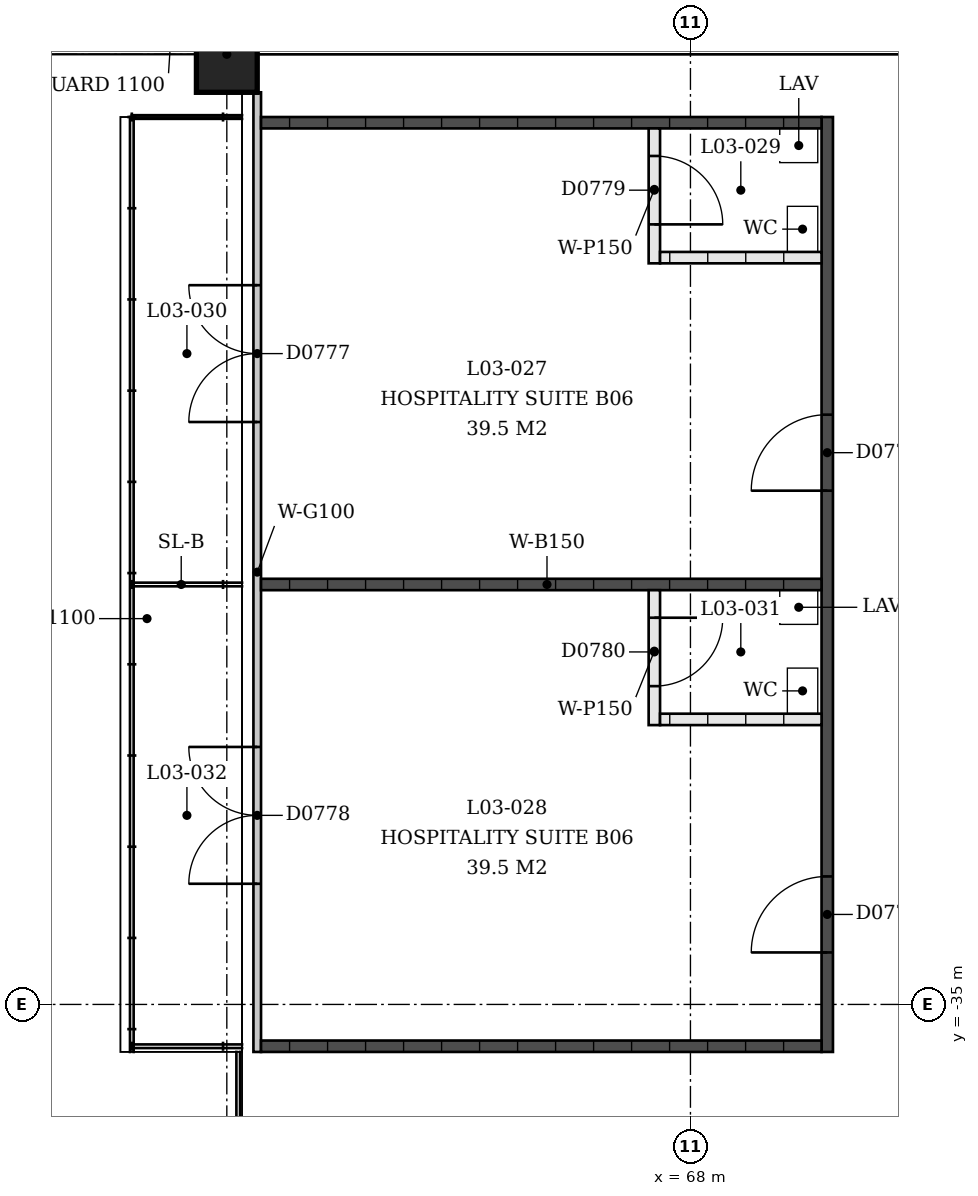
"""IFC4 building model, lengths in metres.
Left out: names, types, materials, properties, quantities, classifications, styles, units other than length and angle.
Written with IfcOpenShell. Run it as: python <this file> out.ifc"""

import sys

from ifc_helpers import new_model, si_unit, direction, frame, frame_2d, origin, origin_2d, place, context, subcontext, project, spatial, rectangle, extrude, element, fill, save


model = new_model("IFC4")
c1 = context("Model", 3, precision=1e-05, world=origin(), true_north=direction((0.0, 1.0)))
c2 = subcontext(c1, "Body", "Model", "MODEL_VIEW")
j1 = project(units=[si_unit("LENGTHUNIT", "METRE"), si_unit("PLANEANGLEUNIT", "RADIAN")], contexts=[c1])
p1 = place(None, origin())
s1 = spatial("IfcSite", under=j1, at=p1, CompositionType="ELEMENT")
p2 = place(p1, origin())
s2 = spatial("IfcBuilding", under=s1, at=p2, CompositionType="ELEMENT")
p3 = place(p2, frame((0.0, 0.0, 13.5)))
s3 = spatial("IfcBuildingStorey", under=s2, at=p3, CompositionType="ELEMENT", Elevation=13.5)
p4 = place(p3, frame((61.9, -22.5, 0.0), z_axis=(0.0, 0.0, 1.0), x_axis=(0.0, 1.0, 0.0)))
e1 = element("IfcColumn", 1, at=p4, inside=s3, PredefinedType="COLUMN", context=c2, shape_type="SweptSolid", body=[
    extrude(rectangle(XDim=1.0, YDim=0.8, at=origin_2d()), origin(), (0.0, 0.0, 1.0), 2.033),
])
p5 = place(p3, frame((62.3, -23.0, 0.0), z_axis=(0.0, 0.0, 1.0), x_axis=(0.0, -1.0, 0.0)))
e2 = element("IfcWall", 2, at=p5, inside=s3, PredefinedType="PARTITIONING", context=c2, shape_type="SweptSolid", body=[
    extrude(rectangle(XDim=12.625, YDim=0.1, at=frame_2d((6.312, 0.0))), origin(), (0.0, 0.0, 1.0), 3.0),
])
p6 = place(p5, frame((2.538, 0.0, 0.0)))
e3 = element("IfcOpeningElement", 3, at=p6, cuts=e2, PredefinedType="OPENING", context=c2, shape_type="SweptSolid", body=[
    extrude(rectangle(XDim=1.8, YDim=2.1, at=frame_2d((0.9, 1.05))), frame((0.0, 0.05, 0.0), z_axis=(0.0, -1.0, 0.0), x_axis=(1.0, 0.0, 0.0)), (0.0, 0.0, 1.0), 0.1),
])
p7 = place(p5, frame((8.613, 0.0, 0.0)))
e4 = element("IfcOpeningElement", 4, at=p7, cuts=e2, PredefinedType="OPENING", context=c2, shape_type="SweptSolid", body=[
    extrude(rectangle(XDim=1.8, YDim=2.1, at=frame_2d((0.9, 1.05))), frame((0.0, 0.05, 0.0), z_axis=(0.0, -1.0, 0.0), x_axis=(1.0, 0.0, 0.0)), (0.0, 0.0, 1.0), 0.1),
])
p8 = place(p3, frame((69.8, -23.325, 0.0), z_axis=(0.0, 0.0, 1.0), x_axis=(0.0, -1.0, 0.0)))
e5 = element("IfcWall", 5, at=p8, inside=s3, PredefinedType="SOLIDWALL", context=c2, shape_type="SweptSolid", body=[
    extrude(rectangle(XDim=12.3, YDim=0.15, at=frame_2d((6.15, 0.0))), origin(), (0.0, 0.0, 1.0), 3.0),
])
p9 = place(p8, frame((3.916, 0.0, 0.0)))
e6 = element("IfcOpeningElement", 6, at=p9, cuts=e5, PredefinedType="OPENING", context=c2, shape_type="SweptSolid", body=[
    extrude(rectangle(XDim=1.0, YDim=2.1, at=frame_2d((0.5, 1.05))), frame((0.0, 0.075, 0.0), z_axis=(0.0, -1.0, 0.0), x_axis=(1.0, 0.0, 0.0)), (0.0, 0.0, 1.0), 0.15),
])
p10 = place(p8, frame((9.991, 0.0, 0.0)))
e7 = element("IfcOpeningElement", 7, at=p10, cuts=e5, PredefinedType="OPENING", context=c2, shape_type="SweptSolid", body=[
    extrude(rectangle(XDim=1.0, YDim=2.1, at=frame_2d((0.5, 1.05))), frame((0.0, 0.075, 0.0), z_axis=(0.0, -1.0, 0.0), x_axis=(1.0, 0.0, 0.0)), (0.0, 0.0, 1.0), 0.15),
])
for number, where, z_axis, x_axis in (
    (8, (62.35, -23.4, 0.0), (0.0, 0.0, 1.0), (1.0, 0.0, 0.0)),
    (9, (62.35, -29.475, 0.0), (0.0, 0.0, 1.0), (1.0, 0.0, 0.0)),
    (10, (62.35, -35.55, 0.0), (0.0, 0.0, 1.0), (1.0, 0.0, 0.0)),
):
    element("IfcWall", number, at=place(p3, frame(where, z_axis=z_axis, x_axis=x_axis)), inside=s3, PredefinedType="SOLIDWALL", context=c2, shape_type="SweptSolid", body=[
        extrude(rectangle(XDim=7.375, YDim=0.15, at=frame_2d((3.688, 0.0))), origin(), (0.0, 0.0, 1.0), 3.0),
    ])
p11 = place(p3, frame((67.525, -23.475, 0.0), z_axis=(0.0, 0.0, 1.0), x_axis=(0.0, -1.0, 0.0)))
e11 = element("IfcWall", 11, at=p11, inside=s3, PredefinedType="PARTITIONING", context=c2, shape_type="SweptSolid", body=[
    extrude(rectangle(XDim=1.775, YDim=0.15, at=frame_2d((0.887, 0.0))), origin(), (0.0, 0.0, 1.0), 3.0),
])
p12 = place(p11, frame((0.363, 0.0, 0.0)))
e12 = element("IfcOpeningElement", 12, at=p12, cuts=e11, PredefinedType="OPENING", context=c2, shape_type="SweptSolid", body=[
    extrude(rectangle(XDim=0.9, YDim=2.1, at=frame_2d((0.45, 1.05))), frame((0.0, 0.075, 0.0), z_axis=(0.0, -1.0, 0.0), x_axis=(1.0, 0.0, 0.0)), (0.0, 0.0, 1.0), 0.15),
])
p13 = place(p3, frame((67.6, -25.175, 0.0), z_axis=(0.0, 0.0, 1.0), x_axis=(1.0, 0.0, 0.0)))
e13 = element("IfcWall", 13, at=p13, inside=s3, PredefinedType="PARTITIONING", context=c2, shape_type="SweptSolid", body=[
    extrude(rectangle(XDim=2.125, YDim=0.15, at=frame_2d((1.062, 0.0))), origin(), (0.0, 0.0, 1.0), 3.0),
])
p14 = place(p3, frame((67.525, -29.55, 0.0), z_axis=(0.0, 0.0, 1.0), x_axis=(0.0, -1.0, 0.0)))
e14 = element("IfcWall", 14, at=p14, inside=s3, PredefinedType="PARTITIONING", context=c2, shape_type="SweptSolid", body=[
    extrude(rectangle(XDim=1.775, YDim=0.15, at=frame_2d((0.887, 0.0))), origin(), (0.0, 0.0, 1.0), 3.0),
])
p15 = place(p14, frame((0.363, 0.0, 0.0)))
e15 = element("IfcOpeningElement", 15, at=p15, cuts=e14, PredefinedType="OPENING", context=c2, shape_type="SweptSolid", body=[
    extrude(rectangle(XDim=0.9, YDim=2.1, at=frame_2d((0.45, 1.05))), frame((0.0, 0.075, 0.0), z_axis=(0.0, -1.0, 0.0), x_axis=(1.0, 0.0, 0.0)), (0.0, 0.0, 1.0), 0.15),
])
p16 = place(p3, frame((67.6, -31.25, 0.0), z_axis=(0.0, 0.0, 1.0), x_axis=(1.0, 0.0, 0.0)))
e16 = element("IfcWall", 16, at=p16, inside=s3, PredefinedType="PARTITIONING", context=c2, shape_type="SweptSolid", body=[
    extrude(rectangle(XDim=2.125, YDim=0.15, at=frame_2d((1.062, 0.0))), origin(), (0.0, 0.0, 1.0), 3.0),
])
p17 = place(p9, origin())
e17 = element("IfcDoor", 17, at=p17, inside=s3, OperationType="SINGLE_SWING_RIGHT", PredefinedType="DOOR", context=c2, shape_type="SweptSolid", body=[
    extrude(rectangle(XDim=1.0, YDim=2.1, at=frame_2d((0.5, 1.05))), frame((0.0, 0.025, 0.0), z_axis=(0.0, -1.0, 0.0), x_axis=(1.0, 0.0, 0.0)), (0.0, 0.0, 1.0), 0.05),
])
fill(e6, e17)
p18 = place(p10, origin())
e18 = element("IfcDoor", 18, at=p18, inside=s3, OperationType="SINGLE_SWING_RIGHT", PredefinedType="DOOR", context=c2, shape_type="SweptSolid", body=[
    extrude(rectangle(XDim=1.0, YDim=2.1, at=frame_2d((0.5, 1.05))), frame((0.0, 0.025, 0.0), z_axis=(0.0, -1.0, 0.0), x_axis=(1.0, 0.0, 0.0)), (0.0, 0.0, 1.0), 0.05),
])
fill(e7, e18)
p19 = place(p6, origin())
e19 = element("IfcDoor", 19, at=p19, inside=s3, OperationType="DOUBLE_DOOR_SINGLE_SWING", PredefinedType="DOOR", context=c2, shape_type="SweptSolid", body=[
    extrude(rectangle(XDim=1.8, YDim=2.1, at=frame_2d((0.9, 1.05))), frame((0.0, 0.025, 0.0), z_axis=(0.0, -1.0, 0.0), x_axis=(1.0, 0.0, 0.0)), (0.0, 0.0, 1.0), 0.05),
])
fill(e3, e19)
p20 = place(p7, origin())
e20 = element("IfcDoor", 20, at=p20, inside=s3, OperationType="DOUBLE_DOOR_SINGLE_SWING", PredefinedType="DOOR", context=c2, shape_type="SweptSolid", body=[
    extrude(rectangle(XDim=1.8, YDim=2.1, at=frame_2d((0.9, 1.05))), frame((0.0, 0.025, 0.0), z_axis=(0.0, -1.0, 0.0), x_axis=(1.0, 0.0, 0.0)), (0.0, 0.0, 1.0), 0.05),
])
fill(e4, e20)
p21 = place(p12, origin())
e21 = element("IfcDoor", 21, at=p21, inside=s3, OperationType="SINGLE_SWING_LEFT", PredefinedType="DOOR", context=c2, shape_type="SweptSolid", body=[
    extrude(rectangle(XDim=0.9, YDim=2.1, at=frame_2d((0.45, 1.05))), frame((0.0, 0.025, 0.0), z_axis=(0.0, -1.0, 0.0), x_axis=(1.0, 0.0, 0.0)), (0.0, 0.0, 1.0), 0.05),
])
fill(e12, e21)
p22 = place(p15, origin())
e22 = element("IfcDoor", 22, at=p22, inside=s3, OperationType="SINGLE_SWING_RIGHT", PredefinedType="DOOR", context=c2, shape_type="SweptSolid", body=[
    extrude(rectangle(XDim=0.9, YDim=2.1, at=frame_2d((0.45, 1.05))), frame((0.0, 0.025, 0.0), z_axis=(0.0, -1.0, 0.0), x_axis=(1.0, 0.0, 0.0)), (0.0, 0.0, 1.0), 0.05),
])
fill(e15, e22)
save(model, sys.argv[1])
